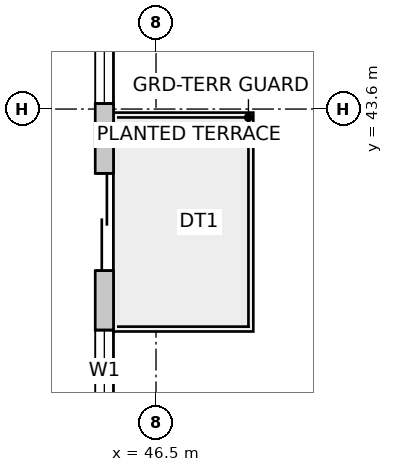
"""IFC4 building model, lengths in metres.
Left out: names, types, materials, properties, quantities, classifications, styles, units other than length and angle.
Written with IfcOpenShell. Run it as: python <this file> out.ifc"""

import sys

from ifc_helpers import new_model, si_unit, direction, frame, frame_2d, origin, place, context, subcontext, project, spatial, rectangle, extrude, source, transform, mapped, element, fill, save


model = new_model("IFC4")
c1 = context("Model", 3, precision=1e-05, world=origin(), true_north=direction((0.0, 1.0)))
c2 = subcontext(c1, "Body", "Model", "MODEL_VIEW")
j1 = project(units=[si_unit("LENGTHUNIT", "METRE"), si_unit("PLANEANGLEUNIT", "RADIAN")], contexts=[c1])
p1 = place(None, origin())
s1 = spatial("IfcSite", under=j1, at=p1, CompositionType="ELEMENT")
p2 = place(p1, origin())
s2 = spatial("IfcBuilding", under=s1, at=p2, CompositionType="ELEMENT")
p3 = place(p2, frame((0.0, 0.0, 221.9)))
s3 = spatial("IfcBuildingStorey", under=s2, at=p3, CompositionType="ELEMENT", Elevation=221.9)
p4 = place(p3, frame((45.65, 36.549, 0.0), z_axis=(0.0, 0.0, 1.0), x_axis=(0.0, 1.0, 0.0)))
e1 = element("IfcWall", 1, at=p4, inside=s3, PredefinedType="SOLIDWALL", context=c2, shape_type="SweptSolid", body=[
    extrude(rectangle(XDim=10.73, YDim=0.3, at=frame_2d((5.365, 0.0))), origin(), (0.0, 0.0, 1.0), 3.25),
])
m1 = source(origin(), c2, "Body", "SweptSolid", [
    extrude(rectangle(XDim=1.6, YDim=2.15, at=frame_2d((0.8, 1.075))), frame((0.0, 0.16, 0.0), z_axis=(0.0, -1.0, 0.0), x_axis=(1.0, 0.0, 0.0)), (0.0, 0.0, 1.0), 0.32),
])
p5 = place(p4, frame((4.393, 0.0, 0.0)))
e2 = element("IfcOpeningElement", 2, at=p5, cuts=e1, PredefinedType="OPENING", context=c2, shape_type="MappedRepresentation", body=[
    mapped(m1, transform((0.0, 0.0, 0.0), scale=1.0)),
])
m2 = source(origin(), c2, "Body", "SweptSolid", [
    extrude(rectangle(XDim=2.4, YDim=2.2, at=frame_2d((1.2, 1.1))), frame((0.0, 0.16, 0.0), z_axis=(0.0, -1.0, 0.0), x_axis=(1.0, 0.0, 0.0)), (0.0, 0.0, 1.0), 0.32),
])
p6 = place(p4, frame((1.016, 0.0, 0.85)))
e3 = element("IfcOpeningElement", 3, at=p6, cuts=e1, PredefinedType="OPENING", context=c2, shape_type="MappedRepresentation", body=[
    mapped(m2, transform((0.0, 0.0, 0.0), scale=1.0)),
])
p7 = place(p4, frame((7.142, 0.0, 0.85)))
e4 = element("IfcOpeningElement", 4, at=p7, cuts=e1, PredefinedType="OPENING", context=c2, shape_type="MappedRepresentation", body=[
    mapped(m2, transform((0.0, 0.0, 0.0), scale=1.0)),
])
m3 = source(origin(), c2, "Body", "SweptSolid", [
    extrude(rectangle(XDim=1.6, YDim=2.15, at=frame_2d((0.8, 1.075))), frame((0.0, 0.025, 0.0), z_axis=(0.0, -1.0, 0.0), x_axis=(1.0, 0.0, 0.0)), (0.0, 0.0, 1.0), 0.05),
])
p8 = place(p5, origin())
e5 = element("IfcDoor", 5, at=p8, inside=s3, OperationType="DOUBLE_DOOR_SLIDING", PredefinedType="DOOR", context=c2, shape_type="MappedRepresentation", body=[
    mapped(m3, transform((0.0, 0.0, 0.0), scale=1.0)),
])
fill(e2, e5)
m4 = source(origin(), c2, "Body", "SweptSolid", [
    extrude(rectangle(XDim=2.4, YDim=2.2, at=frame_2d((1.2, 1.1))), frame((0.0, -0.015, 0.0), z_axis=(0.0, -1.0, 0.0), x_axis=(1.0, 0.0, 0.0)), (0.0, 0.0, 1.0), 0.06),
])
p9 = place(p6, origin())
e6 = element("IfcWindow", 6, at=p9, inside=s3, PartitioningType="SINGLE_PANEL", PredefinedType="WINDOW", context=c2, shape_type="MappedRepresentation", body=[
    mapped(m4, transform((0.0, 0.0, 0.0), scale=1.0)),
])
fill(e3, e6)
p10 = place(p7, origin())
e7 = element("IfcWindow", 7, at=p10, inside=s3, PartitioningType="SINGLE_PANEL", PredefinedType="WINDOW", context=c2, shape_type="MappedRepresentation", body=[
    mapped(m4, transform((0.0, 0.0, 0.0), scale=1.0)),
])
fill(e4, e7)
save(model, sys.argv[1])
